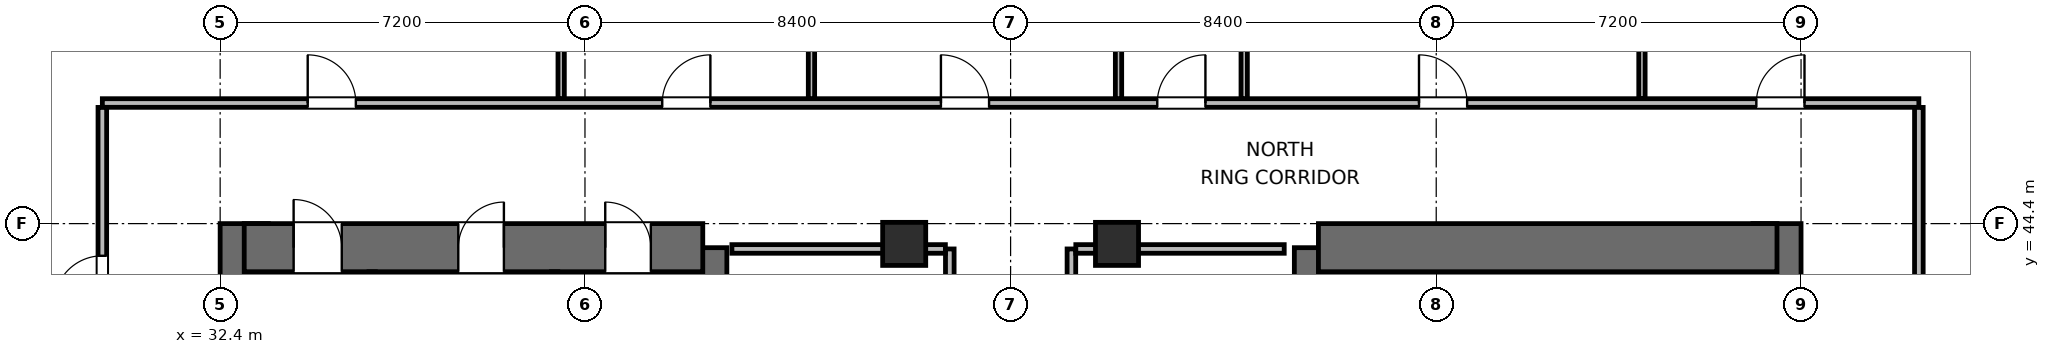
"""IFC4 building model, lengths in metres.
Left out: names, types, materials, properties, quantities, classifications, styles, units other than length and angle.
Written with IfcOpenShell. Run it as: python <this file> out.ifc"""

import sys

from ifc_helpers import new_model, si_unit, direction, frame, frame_2d, origin, origin_2d, place, context, subcontext, project, spatial, rectangle, extrude, element, fill, save


model = new_model("IFC4")
c1 = context("Model", 3, precision=1e-05, world=origin(), true_north=direction((0.0, 1.0)))
c2 = subcontext(c1, "Body", "Model", "MODEL_VIEW")
j1 = project(units=[si_unit("LENGTHUNIT", "METRE"), si_unit("PLANEANGLEUNIT", "RADIAN")], contexts=[c1])
p1 = place(None, origin())
s1 = spatial("IfcSite", under=j1, at=p1, CompositionType="ELEMENT")
p2 = place(p1, origin())
s2 = spatial("IfcBuilding", under=s1, at=p2, CompositionType="ELEMENT")
p3 = place(p2, frame((0.0, 0.0, 33.3)))
s3 = spatial("IfcBuildingStorey", under=s2, at=p3, CompositionType="ELEMENT", Elevation=33.3)
p4 = place(p3, frame((32.875, 27.6, 0.0), z_axis=(0.0, 0.0, 1.0), x_axis=(0.0, 1.0, 0.0)))
e1 = element("IfcWall", 1, at=p4, inside=s3, PredefinedType="SHEAR", context=c2, shape_type="SweptSolid", body=[
    extrude(rectangle(XDim=16.8, YDim=0.95, at=frame_2d((8.4, 0.0))), origin(), (0.0, 0.0, 1.0), 3.9),
])
p5 = place(p3, frame((41.925, 37.8, 0.0), z_axis=(0.0, 0.0, 1.0), x_axis=(0.0, 1.0, 0.0)))
e2 = element("IfcWall", 2, at=p5, inside=s3, PredefinedType="SHEAR", context=c2, shape_type="SweptSolid", body=[
    extrude(rectangle(XDim=6.125, YDim=0.95, at=frame_2d((3.062, 0.0))), origin(), (0.0, 0.0, 1.0), 3.9),
])
p6 = place(p3, frame((32.875, 43.925, 0.0), z_axis=(0.0, 0.0, 1.0), x_axis=(1.0, 0.0, 0.0)))
e3 = element("IfcWall", 3, at=p6, inside=s3, PredefinedType="SHEAR", context=c2, shape_type="SweptSolid", body=[
    extrude(rectangle(XDim=9.05, YDim=0.95, at=frame_2d((4.525, 0.0))), origin(), (0.0, 0.0, 1.0), 3.9),
])
p7 = place(p6, frame((0.975, 0.0, 0.0)))
e4 = element("IfcOpeningElement", 4, at=p7, cuts=e3, PredefinedType="OPENING", context=c2, shape_type="SweptSolid", body=[
    extrude(rectangle(XDim=0.95, YDim=2.04, at=frame_2d((0.475, 1.02))), frame((0.0, 0.485, 0.0), z_axis=(0.0, -1.0, 0.0), x_axis=(1.0, 0.0, 0.0)), (0.0, 0.0, 1.0), 0.97),
])
p8 = place(p6, frame((4.225, 0.0, 0.0)))
e5 = element("IfcOpeningElement", 5, at=p8, cuts=e3, PredefinedType="OPENING", context=c2, shape_type="SweptSolid", body=[
    extrude(rectangle(XDim=0.9, YDim=2.02, at=frame_2d((0.45, 1.01))), frame((0.0, 0.485, 0.0), z_axis=(0.0, -1.0, 0.0), x_axis=(1.0, 0.0, 0.0)), (0.0, 0.0, 1.0), 0.97),
])
p9 = place(p6, frame((7.125, 0.0, 0.0)))
e6 = element("IfcOpeningElement", 6, at=p9, cuts=e3, PredefinedType="OPENING", context=c2, shape_type="SweptSolid", body=[
    extrude(rectangle(XDim=0.9, YDim=2.02, at=frame_2d((0.45, 1.01))), frame((0.0, 0.485, 0.0), z_axis=(0.0, -1.0, 0.0), x_axis=(1.0, 0.0, 0.0)), (0.0, 0.0, 1.0), 0.97),
])
p10 = place(p3, frame((54.075, 38.0, 0.0), z_axis=(0.0, 0.0, 1.0), x_axis=(0.0, 1.0, 0.0)))
e7 = element("IfcWall", 7, at=p10, inside=s3, PredefinedType="SHEAR", context=c2, shape_type="SweptSolid", body=[
    extrude(rectangle(XDim=5.925, YDim=0.95, at=frame_2d((2.962, 0.0))), origin(), (0.0, 0.0, 1.0), 3.9),
])
p11 = place(p3, frame((63.125, 27.6, 0.0), z_axis=(0.0, 0.0, 1.0), x_axis=(0.0, 1.0, 0.0)))
e8 = element("IfcWall", 8, at=p11, inside=s3, PredefinedType="SHEAR", context=c2, shape_type="SweptSolid", body=[
    extrude(rectangle(XDim=16.8, YDim=0.95, at=frame_2d((8.4, 0.0))), origin(), (0.0, 0.0, 1.0), 3.9),
])
p12 = place(p3, frame((54.075, 43.925, 0.0), z_axis=(0.0, 0.0, 1.0), x_axis=(1.0, 0.0, 0.0)))
e9 = element("IfcWall", 9, at=p12, inside=s3, PredefinedType="SHEAR", context=c2, shape_type="SweptSolid", body=[
    extrude(rectangle(XDim=9.05, YDim=0.95, at=frame_2d((4.525, 0.0))), origin(), (0.0, 0.0, 1.0), 3.9),
])
for number, where, z_axis, x_axis in (
    (10, (45.9, 44.0, 0.0), (0.0, 0.0, 1.0), (1.0, 0.0, 0.0)),
    (11, (50.1, 44.0, 0.0), (0.0, 0.0, 1.0), (1.0, 0.0, 0.0)),
):
    element("IfcColumn", number, at=place(p3, frame(where, z_axis=z_axis, x_axis=x_axis)), inside=s3, PredefinedType="COLUMN", context=c2, shape_type="SweptSolid", body=[
        extrude(rectangle(XDim=0.85, YDim=0.85, at=origin_2d()), origin(), (0.0, 0.0, 1.0), 3.9),
    ])
for number, where, z_axis, x_axis in (
    (12, (35.4, 41.095, 0.0), (0.0, 0.0, 1.0), (0.0, 1.0, 0.0)),
    (13, (39.0, 41.095, 0.0), (0.0, 0.0, 1.0), (0.0, 1.0, 0.0)),
):
    element("IfcWall", number, at=place(p3, frame(where, z_axis=z_axis, x_axis=x_axis)), inside=s3, PredefinedType="PARTITIONING", context=c2, shape_type="SweptSolid", body=[
        extrude(rectangle(XDim=2.355, YDim=0.125, at=frame_2d((1.177, 0.0))), origin(), (0.0, 0.0, 1.0), 3.64),
    ])
p13 = place(p3, frame((46.8, 37.9, 0.0), z_axis=(0.0, 0.0, 1.0), x_axis=(0.0, 1.0, 0.0)))
e14 = element("IfcWall", 14, at=p13, inside=s3, PredefinedType="PARTITIONING", context=c2, shape_type="SweptSolid", body=[
    extrude(rectangle(XDim=6.0, YDim=0.17, at=frame_2d((3.0, 0.0))), origin(), (0.0, 0.0, 1.0), 3.64),
])
p14 = place(p13, frame((0.54, 0.0, 0.0)))
e15 = element("IfcOpeningElement", 15, at=p14, cuts=e14, PredefinedType="OPENING", context=c2, shape_type="SweptSolid", body=[
    extrude(rectangle(XDim=0.9, YDim=2.02, at=frame_2d((0.45, 1.01))), frame((0.0, 0.095, 0.0), z_axis=(0.0, -1.0, 0.0), x_axis=(1.0, 0.0, 0.0)), (0.0, 0.0, 1.0), 0.19),
])
p15 = place(p13, frame((2.55, 0.0, 0.0)))
e16 = element("IfcOpeningElement", 16, at=p15, cuts=e14, PredefinedType="OPENING", context=c2, shape_type="SweptSolid", body=[
    extrude(rectangle(XDim=0.9, YDim=2.02, at=frame_2d((0.45, 1.01))), frame((0.0, 0.095, 0.0), z_axis=(0.0, -1.0, 0.0), x_axis=(1.0, 0.0, 0.0)), (0.0, 0.0, 1.0), 0.19),
])
p16 = place(p13, frame((4.56, 0.0, 0.0)))
e17 = element("IfcOpeningElement", 17, at=p16, cuts=e14, PredefinedType="OPENING", context=c2, shape_type="SweptSolid", body=[
    extrude(rectangle(XDim=0.9, YDim=2.02, at=frame_2d((0.45, 1.01))), frame((0.0, 0.095, 0.0), z_axis=(0.0, -1.0, 0.0), x_axis=(1.0, 0.0, 0.0)), (0.0, 0.0, 1.0), 0.19),
])
p17 = place(p3, frame((42.5, 43.9, 0.0), z_axis=(0.0, 0.0, 1.0), x_axis=(1.0, 0.0, 0.0)))
e18 = element("IfcWall", 18, at=p17, inside=s3, PredefinedType="PARTITIONING", context=c2, shape_type="SweptSolid", body=[
    extrude(rectangle(XDim=4.213, YDim=0.17, at=frame_2d((2.106, 0.0))), origin(), (0.0, 0.0, 1.0), 2.525),
])
p18 = place(p3, frame((49.2, 37.9, 0.0), z_axis=(0.0, 0.0, 1.0), x_axis=(0.0, 1.0, 0.0)))
e19 = element("IfcWall", 19, at=p18, inside=s3, PredefinedType="PARTITIONING", context=c2, shape_type="SweptSolid", body=[
    extrude(rectangle(XDim=6.0, YDim=0.17, at=frame_2d((3.0, 0.0))), origin(), (0.0, 0.0, 1.0), 3.64),
])
p19 = place(p18, frame((0.69, 0.0, 0.0)))
e20 = element("IfcOpeningElement", 20, at=p19, cuts=e19, PredefinedType="OPENING", context=c2, shape_type="SweptSolid", body=[
    extrude(rectangle(XDim=0.9, YDim=2.02, at=frame_2d((0.45, 1.01))), frame((0.0, 0.095, 0.0), z_axis=(0.0, -1.0, 0.0), x_axis=(1.0, 0.0, 0.0)), (0.0, 0.0, 1.0), 0.19),
])
p20 = place(p18, frame((3.69, 0.0, 0.0)))
e21 = element("IfcOpeningElement", 21, at=p20, cuts=e19, PredefinedType="OPENING", context=c2, shape_type="SweptSolid", body=[
    extrude(rectangle(XDim=0.9, YDim=2.02, at=frame_2d((0.45, 1.01))), frame((0.0, 0.095, 0.0), z_axis=(0.0, -1.0, 0.0), x_axis=(1.0, 0.0, 0.0)), (0.0, 0.0, 1.0), 0.19),
])
p21 = place(p3, frame((49.287, 43.9, 0.0), z_axis=(0.0, 0.0, 1.0), x_axis=(1.0, 0.0, 0.0)))
e22 = element("IfcWall", 22, at=p21, inside=s3, PredefinedType="PARTITIONING", context=c2, shape_type="SweptSolid", body=[
    extrude(rectangle(XDim=4.113, YDim=0.17, at=frame_2d((2.056, 0.0))), origin(), (0.0, 0.0, 1.0), 2.525),
])
p22 = place(p3, frame((30.075, 46.78, 0.0), z_axis=(0.0, 0.0, 1.0), x_axis=(1.0, 0.0, 0.0)))
e23 = element("IfcWall", 23, at=p22, inside=s3, PredefinedType="PARTITIONING", context=c2, shape_type="SweptSolid", body=[
    extrude(rectangle(XDim=35.85, YDim=0.17, at=frame_2d((17.925, 0.0))), origin(), (0.0, 0.0, 1.0), 3.64),
])
p23 = place(p22, frame((4.053, 0.0, 0.0)))
e24 = element("IfcOpeningElement", 24, at=p23, cuts=e23, PredefinedType="OPENING", context=c2, shape_type="SweptSolid", body=[
    extrude(rectangle(XDim=0.95, YDim=2.04, at=frame_2d((0.475, 1.02))), frame((0.0, 0.095, 0.0), z_axis=(0.0, -1.0, 0.0), x_axis=(1.0, 0.0, 0.0)), (0.0, 0.0, 1.0), 0.19),
])
p24 = place(p22, frame((11.05, 0.0, 0.0)))
e25 = element("IfcOpeningElement", 25, at=p24, cuts=e23, PredefinedType="OPENING", context=c2, shape_type="SweptSolid", body=[
    extrude(rectangle(XDim=0.95, YDim=2.04, at=frame_2d((0.475, 1.02))), frame((0.0, 0.095, 0.0), z_axis=(0.0, -1.0, 0.0), x_axis=(1.0, 0.0, 0.0)), (0.0, 0.0, 1.0), 0.19),
])
p25 = place(p22, frame((16.55, 0.0, 0.0)))
e26 = element("IfcOpeningElement", 26, at=p25, cuts=e23, PredefinedType="OPENING", context=c2, shape_type="SweptSolid", body=[
    extrude(rectangle(XDim=0.95, YDim=2.04, at=frame_2d((0.475, 1.02))), frame((0.0, 0.095, 0.0), z_axis=(0.0, -1.0, 0.0), x_axis=(1.0, 0.0, 0.0)), (0.0, 0.0, 1.0), 0.19),
])
p26 = place(p22, frame((20.82, 0.0, 0.0)))
e27 = element("IfcOpeningElement", 27, at=p26, cuts=e23, PredefinedType="OPENING", context=c2, shape_type="SweptSolid", body=[
    extrude(rectangle(XDim=0.95, YDim=2.04, at=frame_2d((0.475, 1.02))), frame((0.0, 0.095, 0.0), z_axis=(0.0, -1.0, 0.0), x_axis=(1.0, 0.0, 0.0)), (0.0, 0.0, 1.0), 0.19),
])
p27 = place(p22, frame((25.985, 0.0, 0.0)))
e28 = element("IfcOpeningElement", 28, at=p27, cuts=e23, PredefinedType="OPENING", context=c2, shape_type="SweptSolid", body=[
    extrude(rectangle(XDim=0.95, YDim=2.04, at=frame_2d((0.475, 1.02))), frame((0.0, 0.095, 0.0), z_axis=(0.0, -1.0, 0.0), x_axis=(1.0, 0.0, 0.0)), (0.0, 0.0, 1.0), 0.19),
])
p28 = place(p22, frame((32.643, 0.0, 0.0)))
e29 = element("IfcOpeningElement", 29, at=p28, cuts=e23, PredefinedType="OPENING", context=c2, shape_type="SweptSolid", body=[
    extrude(rectangle(XDim=0.95, YDim=2.04, at=frame_2d((0.475, 1.02))), frame((0.0, 0.095, 0.0), z_axis=(0.0, -1.0, 0.0), x_axis=(1.0, 0.0, 0.0)), (0.0, 0.0, 1.0), 0.19),
])
p29 = place(p3, frame((30.075, 25.307, 0.0), z_axis=(0.0, 0.0, 1.0), x_axis=(0.0, 1.0, 0.0)))
e30 = element("IfcWall", 30, at=p29, inside=s3, PredefinedType="PARTITIONING", context=c2, shape_type="SweptSolid", body=[
    extrude(rectangle(XDim=21.386, YDim=0.17, at=frame_2d((10.693, 0.0))), origin(), (0.0, 0.0, 1.0), 3.64),
])
p30 = place(p29, frame((3.528, 0.0, 0.0)))
e31 = element("IfcOpeningElement", 31, at=p30, cuts=e30, PredefinedType="OPENING", context=c2, shape_type="SweptSolid", body=[
    extrude(rectangle(XDim=0.95, YDim=2.04, at=frame_2d((0.475, 1.02))), frame((0.0, 0.095, 0.0), z_axis=(0.0, -1.0, 0.0), x_axis=(1.0, 0.0, 0.0)), (0.0, 0.0, 1.0), 0.19),
])
p31 = place(p29, frame((10.818, 0.0, 0.0)))
e32 = element("IfcOpeningElement", 32, at=p31, cuts=e30, PredefinedType="OPENING", context=c2, shape_type="SweptSolid", body=[
    extrude(rectangle(XDim=0.95, YDim=2.04, at=frame_2d((0.475, 1.02))), frame((0.0, 0.095, 0.0), z_axis=(0.0, -1.0, 0.0), x_axis=(1.0, 0.0, 0.0)), (0.0, 0.0, 1.0), 0.19),
])
p32 = place(p29, frame((17.508, 0.0, 0.0)))
e33 = element("IfcOpeningElement", 33, at=p32, cuts=e30, PredefinedType="OPENING", context=c2, shape_type="SweptSolid", body=[
    extrude(rectangle(XDim=0.95, YDim=2.04, at=frame_2d((0.475, 1.02))), frame((0.0, 0.095, 0.0), z_axis=(0.0, -1.0, 0.0), x_axis=(1.0, 0.0, 0.0)), (0.0, 0.0, 1.0), 0.19),
])
p33 = place(p3, frame((65.925, 25.307, 0.0), z_axis=(0.0, 0.0, 1.0), x_axis=(0.0, 1.0, 0.0)))
e34 = element("IfcWall", 34, at=p33, inside=s3, PredefinedType="PARTITIONING", context=c2, shape_type="SweptSolid", body=[
    extrude(rectangle(XDim=21.386, YDim=0.17, at=frame_2d((10.693, 0.0))), origin(), (0.0, 0.0, 1.0), 3.64),
])
p34 = place(p33, frame((5.428, 0.0, 0.0)))
e35 = element("IfcOpeningElement", 35, at=p34, cuts=e34, PredefinedType="OPENING", context=c2, shape_type="SweptSolid", body=[
    extrude(rectangle(XDim=0.95, YDim=2.04, at=frame_2d((0.475, 1.02))), frame((0.0, 0.095, 0.0), z_axis=(0.0, -1.0, 0.0), x_axis=(1.0, 0.0, 0.0)), (0.0, 0.0, 1.0), 0.19),
])
p35 = place(p33, frame((16.208, 0.0, 0.0)))
e36 = element("IfcOpeningElement", 36, at=p35, cuts=e34, PredefinedType="OPENING", context=c2, shape_type="SweptSolid", body=[
    extrude(rectangle(XDim=0.95, YDim=2.04, at=frame_2d((0.475, 1.02))), frame((0.0, 0.095, 0.0), z_axis=(0.0, -1.0, 0.0), x_axis=(1.0, 0.0, 0.0)), (0.0, 0.0, 1.0), 0.19),
])
p36 = place(p3, frame((39.13, 46.867, 0.0), z_axis=(0.0, 0.0, 1.0), x_axis=(0.0, 1.0, 0.0)))
e37 = element("IfcWall", 37, at=p36, inside=s3, PredefinedType="PARTITIONING", context=c2, shape_type="SweptSolid", body=[
    extrude(rectangle(XDim=15.288, YDim=0.125, at=frame_2d((7.644, 0.0))), origin(), (0.0, 0.0, 1.0), 3.64),
])
p37 = place(p3, frame((44.07, 46.867, 0.0), z_axis=(0.0, 0.0, 1.0), x_axis=(0.0, 1.0, 0.0)))
e38 = element("IfcWall", 38, at=p37, inside=s3, PredefinedType="PARTITIONING", context=c2, shape_type="SweptSolid", body=[
    extrude(rectangle(XDim=13.618, YDim=0.125, at=frame_2d((6.809, 0.0))), origin(), (0.0, 0.0, 1.0), 3.003),
])
p38 = place(p3, frame((50.13, 46.867, 0.0), z_axis=(0.0, 0.0, 1.0), x_axis=(0.0, 1.0, 0.0)))
e39 = element("IfcWall", 39, at=p38, inside=s3, PredefinedType="PARTITIONING", context=c2, shape_type="SweptSolid", body=[
    extrude(rectangle(XDim=11.558, YDim=0.125, at=frame_2d((5.779, 0.0))), origin(), (0.0, 0.0, 1.0), 3.64),
])
p39 = place(p3, frame((52.61, 46.867, 0.0), z_axis=(0.0, 0.0, 1.0), x_axis=(0.0, 1.0, 0.0)))
e40 = element("IfcWall", 40, at=p39, inside=s3, PredefinedType="PARTITIONING", context=c2, shape_type="SweptSolid", body=[
    extrude(rectangle(XDim=11.558, YDim=0.125, at=frame_2d((5.779, 0.0))), origin(), (0.0, 0.0, 1.0), 3.003),
])
p40 = place(p3, frame((60.46, 46.867, 0.0), z_axis=(0.0, 0.0, 1.0), x_axis=(0.0, 1.0, 0.0)))
e41 = element("IfcWall", 41, at=p40, inside=s3, PredefinedType="PARTITIONING", context=c2, shape_type="SweptSolid", body=[
    extrude(rectangle(XDim=15.218, YDim=0.125, at=frame_2d((7.609, 0.0))), origin(), (0.0, 0.0, 1.0), 3.64),
])
p41 = place(p7, origin())
e42 = element("IfcDoor", 42, at=p41, inside=s3, OperationType="SINGLE_SWING_LEFT", PredefinedType="DOOR", context=c2, shape_type="SweptSolid", body=[
    extrude(rectangle(XDim=0.95, YDim=2.04, at=frame_2d((0.475, 1.02))), frame((0.0, 0.025, 0.0), z_axis=(0.0, -1.0, 0.0), x_axis=(1.0, 0.0, 0.0)), (0.0, 0.0, 1.0), 0.05),
])
fill(e4, e42)
p42 = place(p8, origin())
e43 = element("IfcDoor", 43, at=p42, inside=s3, OperationType="SINGLE_SWING_RIGHT", PredefinedType="DOOR", context=c2, shape_type="SweptSolid", body=[
    extrude(rectangle(XDim=0.9, YDim=2.02, at=frame_2d((0.45, 1.01))), frame((0.0, 0.025, 0.0), z_axis=(0.0, -1.0, 0.0), x_axis=(1.0, 0.0, 0.0)), (0.0, 0.0, 1.0), 0.05),
])
fill(e5, e43)
p43 = place(p9, origin())
e44 = element("IfcDoor", 44, at=p43, inside=s3, OperationType="SINGLE_SWING_LEFT", PredefinedType="DOOR", context=c2, shape_type="SweptSolid", body=[
    extrude(rectangle(XDim=0.9, YDim=2.02, at=frame_2d((0.45, 1.01))), frame((0.0, 0.025, 0.0), z_axis=(0.0, -1.0, 0.0), x_axis=(1.0, 0.0, 0.0)), (0.0, 0.0, 1.0), 0.05),
])
fill(e6, e44)
p44 = place(p23, origin())
e45 = element("IfcDoor", 45, at=p44, inside=s3, OperationType="SINGLE_SWING_LEFT", PredefinedType="DOOR", context=c2, shape_type="SweptSolid", body=[
    extrude(rectangle(XDim=0.95, YDim=2.04, at=frame_2d((0.475, 1.02))), frame((0.0, 0.025, 0.0), z_axis=(0.0, -1.0, 0.0), x_axis=(1.0, 0.0, 0.0)), (0.0, 0.0, 1.0), 0.05),
])
fill(e24, e45)
p45 = place(p24, origin())
e46 = element("IfcDoor", 46, at=p45, inside=s3, OperationType="SINGLE_SWING_RIGHT", PredefinedType="DOOR", context=c2, shape_type="SweptSolid", body=[
    extrude(rectangle(XDim=0.95, YDim=2.04, at=frame_2d((0.475, 1.02))), frame((0.0, 0.025, 0.0), z_axis=(0.0, -1.0, 0.0), x_axis=(1.0, 0.0, 0.0)), (0.0, 0.0, 1.0), 0.05),
])
fill(e25, e46)
p46 = place(p25, origin())
e47 = element("IfcDoor", 47, at=p46, inside=s3, OperationType="SINGLE_SWING_LEFT", PredefinedType="DOOR", context=c2, shape_type="SweptSolid", body=[
    extrude(rectangle(XDim=0.95, YDim=2.04, at=frame_2d((0.475, 1.02))), frame((0.0, 0.025, 0.0), z_axis=(0.0, -1.0, 0.0), x_axis=(1.0, 0.0, 0.0)), (0.0, 0.0, 1.0), 0.05),
])
fill(e26, e47)
p47 = place(p26, origin())
e48 = element("IfcDoor", 48, at=p47, inside=s3, OperationType="SINGLE_SWING_RIGHT", PredefinedType="DOOR", context=c2, shape_type="SweptSolid", body=[
    extrude(rectangle(XDim=0.95, YDim=2.04, at=frame_2d((0.475, 1.02))), frame((0.0, 0.025, 0.0), z_axis=(0.0, -1.0, 0.0), x_axis=(1.0, 0.0, 0.0)), (0.0, 0.0, 1.0), 0.05),
])
fill(e27, e48)
p48 = place(p27, origin())
e49 = element("IfcDoor", 49, at=p48, inside=s3, OperationType="SINGLE_SWING_LEFT", PredefinedType="DOOR", context=c2, shape_type="SweptSolid", body=[
    extrude(rectangle(XDim=0.95, YDim=2.04, at=frame_2d((0.475, 1.02))), frame((0.0, 0.025, 0.0), z_axis=(0.0, -1.0, 0.0), x_axis=(1.0, 0.0, 0.0)), (0.0, 0.0, 1.0), 0.05),
])
fill(e28, e49)
p49 = place(p28, origin())
e50 = element("IfcDoor", 50, at=p49, inside=s3, OperationType="SINGLE_SWING_RIGHT", PredefinedType="DOOR", context=c2, shape_type="SweptSolid", body=[
    extrude(rectangle(XDim=0.95, YDim=2.04, at=frame_2d((0.475, 1.02))), frame((0.0, 0.025, 0.0), z_axis=(0.0, -1.0, 0.0), x_axis=(1.0, 0.0, 0.0)), (0.0, 0.0, 1.0), 0.05),
])
fill(e29, e50)
p50 = place(p32, origin())
e51 = element("IfcDoor", 51, at=p50, inside=s3, OperationType="SINGLE_SWING_LEFT", PredefinedType="DOOR", context=c2, shape_type="SweptSolid", body=[
    extrude(rectangle(XDim=0.95, YDim=2.04, at=frame_2d((0.475, 1.02))), frame((0.0, 0.025, 0.0), z_axis=(0.0, -1.0, 0.0), x_axis=(1.0, 0.0, 0.0)), (0.0, 0.0, 1.0), 0.05),
])
fill(e33, e51)
save(model, sys.argv[1])
